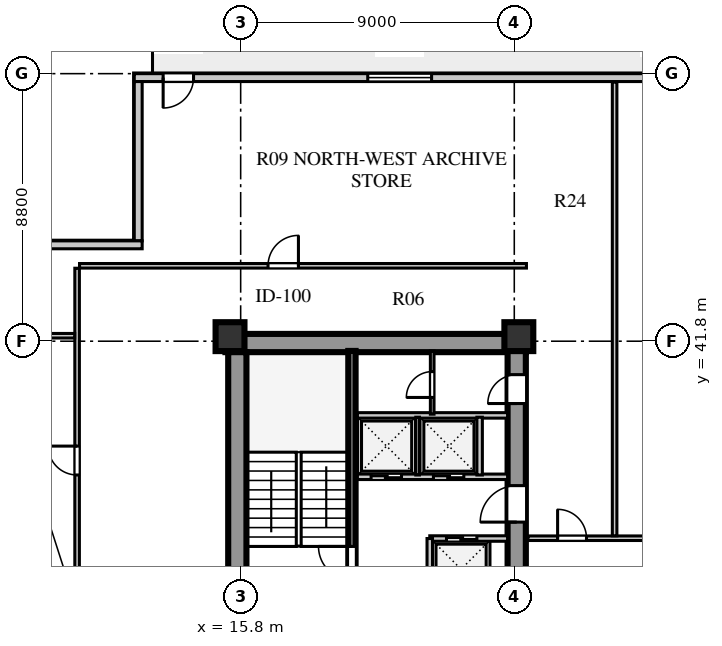
"""IFC4 building model, lengths in metres.
Left out: names, types, materials, properties, quantities, classifications, styles, units other than length and angle.
Written with IfcOpenShell. Run it as: python <this file> out.ifc"""

import sys

from ifc_helpers import new_model, si_unit, direction, frame, frame_2d, origin, origin_2d, place, context, subcontext, project, spatial, rectangle, extrude, element, fill, save


model = new_model("IFC4")
c1 = context("Model", 3, precision=1e-05, world=origin(), true_north=direction((0.0, 1.0)))
c2 = subcontext(c1, "Body", "Model", "MODEL_VIEW")
j1 = project(units=[si_unit("LENGTHUNIT", "METRE"), si_unit("PLANEANGLEUNIT", "RADIAN")], contexts=[c1])
p1 = place(None, origin())
s1 = spatial("IfcSite", under=j1, at=p1, CompositionType="ELEMENT")
p2 = place(p1, origin())
s2 = spatial("IfcBuilding", under=s1, at=p2, CompositionType="ELEMENT")
p3 = place(p2, frame((0.0, 0.0, 58.0)))
s3 = spatial("IfcBuildingStorey", under=s2, at=p3, CompositionType="ELEMENT", Elevation=58.0)
p4 = place(p3, frame((15.3, 41.74, 0.0), z_axis=(0.0, 0.0, 1.0), x_axis=(1.0, 0.0, 0.0)))
e1 = element("IfcWall", 1, at=p4, inside=s3, PredefinedType="SHEAR", context=c2, shape_type="SweptSolid", body=[
    extrude(rectangle(XDim=9.88, YDim=0.6, at=frame_2d((4.94, 0.0))), origin(), (0.0, 0.0, 1.0), 3.72),
])
p5 = place(p3, frame((15.69, 15.81, 0.0), z_axis=(0.0, 0.0, 1.0), x_axis=(0.0, 1.0, 0.0)))
e2 = element("IfcWall", 2, at=p5, inside=s3, PredefinedType="SHEAR", context=c2, shape_type="SweptSolid", body=[
    extrude(rectangle(XDim=25.63, YDim=0.6, at=frame_2d((12.815, 0.0))), origin(), (0.0, 0.0, 1.0), 3.72),
])
p6 = place(p3, frame((24.88, 15.74, 0.0), z_axis=(0.0, 0.0, 1.0), x_axis=(0.0, 1.0, 0.0)))
e3 = element("IfcWall", 3, at=p6, inside=s3, PredefinedType="SHEAR", context=c2, shape_type="SweptSolid", body=[
    extrude(rectangle(XDim=25.76, YDim=0.6, at=frame_2d((12.88, 0.0))), origin(), (0.0, 0.0, 1.0), 3.72),
])
p7 = place(p6, frame((1.61, 0.0, 0.0)))
e4 = element("IfcOpeningElement", 4, at=p7, cuts=e3, PredefinedType="OPENING", context=c2, shape_type="SweptSolid", body=[
    extrude(rectangle(XDim=1.2, YDim=2.1, at=frame_2d((0.6, 1.05))), frame((0.0, 0.31, 0.0), z_axis=(0.0, -1.0, 0.0), x_axis=(1.0, 0.0, 0.0)), (0.0, 0.0, 1.0), 0.62),
])
p8 = place(p6, frame((6.78, 0.0, 0.0)))
e5 = element("IfcOpeningElement", 5, at=p8, cuts=e3, PredefinedType="OPENING", context=c2, shape_type="SweptSolid", body=[
    extrude(rectangle(XDim=0.85, YDim=2.06, at=frame_2d((0.425, 1.03))), frame((0.0, 0.31, 0.0), z_axis=(0.0, -1.0, 0.0), x_axis=(1.0, 0.0, 0.0)), (0.0, 0.0, 1.0), 0.62),
])
p9 = place(p6, frame((12.11, 0.0, 0.0)))
e6 = element("IfcOpeningElement", 6, at=p9, cuts=e3, PredefinedType="OPENING", context=c2, shape_type="SweptSolid", body=[
    extrude(rectangle(XDim=1.5, YDim=2.12, at=frame_2d((0.75, 1.06))), frame((0.0, 0.31, 0.0), z_axis=(0.0, -1.0, 0.0), x_axis=(1.0, 0.0, 0.0)), (0.0, 0.0, 1.0), 0.62),
])
p10 = place(p6, frame((20.11, 0.0, 0.0)))
e7 = element("IfcOpeningElement", 7, at=p10, cuts=e3, PredefinedType="OPENING", context=c2, shape_type="SweptSolid", body=[
    extrude(rectangle(XDim=1.2, YDim=2.12, at=frame_2d((0.6, 1.06))), frame((0.0, 0.31, 0.0), z_axis=(0.0, -1.0, 0.0), x_axis=(1.0, 0.0, 0.0)), (0.0, 0.0, 1.0), 0.62),
])
p11 = place(p6, frame((24.01, 0.0, 0.0)))
e8 = element("IfcOpeningElement", 8, at=p11, cuts=e3, PredefinedType="OPENING", context=c2, shape_type="SweptSolid", body=[
    extrude(rectangle(XDim=0.95, YDim=2.1, at=frame_2d((0.475, 1.05))), frame((0.0, 0.31, 0.0), z_axis=(0.0, -1.0, 0.0), x_axis=(1.0, 0.0, 0.0)), (0.0, 0.0, 1.0), 0.62),
])
for number, where, z_axis, x_axis in (
    (9, (15.45, 41.95, 0.0), (0.0, 0.0, 1.0), (1.0, 0.0, 0.0)),
    (10, (24.95, 41.95, 0.0), (0.0, 0.0, 1.0), (1.0, 0.0, 0.0)),
):
    element("IfcColumn", number, at=place(p3, frame(where, z_axis=z_axis, x_axis=x_axis)), inside=s3, PredefinedType="COLUMN", context=c2, shape_type="SweptSolid", body=[
        extrude(rectangle(XDim=0.95, YDim=0.95, at=origin_2d()), origin(), (0.0, 0.0, 1.0), 3.72),
    ])
p12 = place(p3, frame((46.3, 50.47, 0.0), z_axis=(0.0, 0.0, 1.0), x_axis=(-1.0, 0.0, 0.0)))
e11 = element("IfcWall", 11, at=p12, inside=s3, PredefinedType="SOLIDWALL", context=c2, shape_type="SweptSolid", body=[
    extrude(rectangle(XDim=34.0, YDim=0.26, at=frame_2d((17.0, 0.0))), origin(), (0.0, 0.0, 1.0), 3.72),
])
p13 = place(p12, frame((32.05, 0.0, 0.0)))
e12 = element("IfcOpeningElement", 12, at=p13, cuts=e11, PredefinedType="OPENING", context=c2, shape_type="SweptSolid", body=[
    extrude(rectangle(XDim=1.0, YDim=2.05, at=frame_2d((0.5, 1.025))), frame((0.0, 0.14, 0.0), z_axis=(0.0, -1.0, 0.0), x_axis=(1.0, 0.0, 0.0)), (0.0, 0.0, 1.0), 0.28),
])
p14 = place(p12, frame((24.22, 0.0, 0.8)))
e13 = element("IfcOpeningElement", 13, at=p14, cuts=e11, PredefinedType="OPENING", context=c2, shape_type="SweptSolid", body=[
    extrude(rectangle(XDim=2.1, YDim=1.95, at=frame_2d((1.05, 0.975))), frame((0.0, 0.14, 0.0), z_axis=(0.0, -1.0, 0.0), x_axis=(1.0, 0.0, 0.0)), (0.0, 0.0, 1.0), 0.28),
])
p15 = place(p12, frame((15.875, 0.0, 0.8)))
e14 = element("IfcOpeningElement", 14, at=p15, cuts=e11, PredefinedType="OPENING", context=c2, shape_type="SweptSolid", body=[
    extrude(rectangle(XDim=1.35, YDim=1.9, at=frame_2d((0.675, 0.95))), frame((0.0, 0.14, 0.0), z_axis=(0.0, -1.0, 0.0), x_axis=(1.0, 0.0, 0.0)), (0.0, 0.0, 1.0), 0.28),
])
p16 = place(p12, frame((6.68, 0.0, 0.8)))
e15 = element("IfcOpeningElement", 15, at=p16, cuts=e11, PredefinedType="OPENING", context=c2, shape_type="SweptSolid", body=[
    extrude(rectangle(XDim=1.65, YDim=1.95, at=frame_2d((0.825, 0.975))), frame((0.0, 0.14, 0.0), z_axis=(0.0, -1.0, 0.0), x_axis=(1.0, 0.0, 0.0)), (0.0, 0.0, 1.0), 0.28),
])
p17 = place(p3, frame((12.43, 50.34, 0.0), z_axis=(0.0, 0.0, 1.0), x_axis=(0.0, -1.0, 0.0)))
e16 = element("IfcWall", 16, at=p17, inside=s3, PredefinedType="SOLIDWALL", context=c2, shape_type="SweptSolid", body=[
    extrude(rectangle(XDim=5.24, YDim=0.26, at=frame_2d((2.62, 0.0))), origin(), (0.0, 0.0, 1.0), 3.72),
])
p18 = place(p3, frame((12.56, 44.97, 0.0), z_axis=(0.0, 0.0, 1.0), x_axis=(-1.0, 0.0, 0.0)))
e17 = element("IfcWall", 17, at=p18, inside=s3, PredefinedType="SOLIDWALL", context=c2, shape_type="SweptSolid", body=[
    extrude(rectangle(XDim=5.76, YDim=0.26, at=frame_2d((2.88, 0.0))), origin(), (0.0, 0.0, 1.0), 3.72),
])
p19 = place(p3, frame((19.46, 33.3, 0.0), z_axis=(0.0, 0.0, 1.0), x_axis=(0.0, 1.0, 0.0)))
e18 = element("IfcWall", 18, at=p19, inside=s3, PredefinedType="SHEAR", context=c2, shape_type="SweptSolid", body=[
    extrude(rectangle(XDim=8.18, YDim=0.24, at=frame_2d((4.09, 0.0))), origin(), (0.0, 0.0, 1.0), 4.0),
])
p20 = place(p19, frame((0.65, 0.0, 0.0)))
e19 = element("IfcOpeningElement", 19, at=p20, cuts=e18, PredefinedType="OPENING", context=c2, shape_type="SweptSolid", body=[
    extrude(rectangle(XDim=1.1, YDim=2.1, at=frame_2d((0.55, 1.05))), frame((0.0, 0.13, 0.0), z_axis=(0.0, -1.0, 0.0), x_axis=(1.0, 0.0, 0.0)), (0.0, 0.0, 1.0), 0.26),
])
p21 = place(p3, frame((22.02, 35.31, 0.0), z_axis=(0.0, 0.0, 1.0), x_axis=(1.0, 0.0, 0.0)))
e20 = element("IfcWall", 20, at=p21, inside=s3, PredefinedType="SOLIDWALL", context=c2, shape_type="SweptSolid", body=[
    extrude(rectangle(XDim=2.56, YDim=0.18, at=frame_2d((1.28, 0.0))), origin(), (0.0, 0.0, 1.0), 3.72),
])
p22 = place(p21, frame((0.55, 0.0, 0.0)))
e21 = element("IfcOpeningElement", 21, at=p22, cuts=e20, PredefinedType="OPENING", context=c2, shape_type="SweptSolid", body=[
    extrude(rectangle(XDim=1.0, YDim=2.1, at=frame_2d((0.5, 1.05))), frame((0.0, 0.1, 0.0), z_axis=(0.0, -1.0, 0.0), x_axis=(1.0, 0.0, 0.0)), (0.0, 0.0, 1.0), 0.2),
])
p23 = place(p3, frame((22.02, 33.3, 0.0), z_axis=(0.0, 0.0, 1.0), x_axis=(0.0, 1.0, 0.0)))
e22 = element("IfcWall", 22, at=p23, inside=s3, PredefinedType="SOLIDWALL", context=c2, shape_type="SweptSolid", body=[
    extrude(rectangle(XDim=2.01, YDim=0.18, at=frame_2d((1.005, 0.0))), origin(), (0.0, 0.0, 1.0), 3.72),
])
p24 = place(p3, frame((19.64, 37.34, 0.0), z_axis=(0.0, 0.0, 1.0), x_axis=(1.0, 0.0, 0.0)))
e23 = element("IfcWall", 23, at=p24, inside=s3, PredefinedType="SOLIDWALL", context=c2, shape_type="SweptSolid", body=[
    extrude(rectangle(XDim=4.94, YDim=0.18, at=frame_2d((2.47, 0.0))), origin(), (0.0, 0.0, 1.0), 3.72),
])
p25 = place(p24, frame((0.45, 0.0, 0.0)))
e24 = element("IfcOpeningElement", 24, at=p25, cuts=e23, PredefinedType="OPENING", context=c2, shape_type="SweptSolid", body=[
    extrude(rectangle(XDim=1.0, YDim=2.1, at=frame_2d((0.5, 1.05))), frame((0.0, 0.1, 0.0), z_axis=(0.0, -1.0, 0.0), x_axis=(1.0, 0.0, 0.0)), (0.0, 0.0, 1.0), 0.2),
])
p26 = place(p24, frame((2.5, 0.0, 0.0)))
e25 = element("IfcOpeningElement", 25, at=p26, cuts=e23, PredefinedType="OPENING", context=c2, shape_type="SweptSolid", body=[
    extrude(rectangle(XDim=1.0, YDim=2.1, at=frame_2d((0.5, 1.05))), frame((0.0, 0.1, 0.0), z_axis=(0.0, -1.0, 0.0), x_axis=(1.0, 0.0, 0.0)), (0.0, 0.0, 1.0), 0.2),
])
p27 = place(p3, frame((19.64, 39.36, 0.0), z_axis=(0.0, 0.0, 1.0), x_axis=(1.0, 0.0, 0.0)))
e26 = element("IfcWall", 26, at=p27, inside=s3, PredefinedType="SOLIDWALL", context=c2, shape_type="SweptSolid", body=[
    extrude(rectangle(XDim=4.94, YDim=0.18, at=frame_2d((2.47, 0.0))), origin(), (0.0, 0.0, 1.0), 3.72),
])
p28 = place(p3, frame((21.62, 37.4, 0.0), z_axis=(0.0, 0.0, 1.0), x_axis=(0.0, 1.0, 0.0)))
e27 = element("IfcWall", 27, at=p28, inside=s3, PredefinedType="PARTITIONING", context=c2, shape_type="SweptSolid", body=[
    extrude(rectangle(XDim=1.9, YDim=0.12, at=frame_2d((0.95, 0.0))), origin(), (0.0, 0.0, 1.0), 3.72),
])
p29 = place(p3, frame((23.66, 37.4, 0.0), z_axis=(0.0, 0.0, 1.0), x_axis=(0.0, 1.0, 0.0)))
e28 = element("IfcWall", 28, at=p29, inside=s3, PredefinedType="SOLIDWALL", context=c2, shape_type="SweptSolid", body=[
    extrude(rectangle(XDim=1.9, YDim=0.18, at=frame_2d((0.95, 0.0))), origin(), (0.0, 0.0, 1.0), 3.72),
])
p30 = place(p3, frame((22.1, 39.4, 0.0), z_axis=(0.0, 0.0, 1.0), x_axis=(0.0, 1.0, 0.0)))
e29 = element("IfcWall", 29, at=p30, inside=s3, PredefinedType="PARTITIONING", context=c2, shape_type="SweptSolid", body=[
    extrude(rectangle(XDim=2.08, YDim=0.12, at=frame_2d((1.04, 0.0))), origin(), (0.0, 0.0, 1.0), 3.72),
])
p31 = place(p30, frame((0.55, 0.0, 0.0)))
e30 = element("IfcOpeningElement", 30, at=p31, cuts=e29, PredefinedType="OPENING", context=c2, shape_type="SweptSolid", body=[
    extrude(rectangle(XDim=0.85, YDim=2.06, at=frame_2d((0.425, 1.03))), frame((0.0, 0.07, 0.0), z_axis=(0.0, -1.0, 0.0), x_axis=(1.0, 0.0, 0.0)), (0.0, 0.0, 1.0), 0.14),
])
p32 = place(p3, frame((25.25, 35.32, 0.0), z_axis=(0.0, 0.0, 1.0), x_axis=(1.0, 0.0, 0.0)))
e31 = element("IfcWall", 31, at=p32, inside=s3, PredefinedType="PARTITIONING", context=c2, shape_type="SweptSolid", body=[
    extrude(rectangle(XDim=9.47, YDim=0.15, at=frame_2d((4.735, 0.0))), origin(), (0.0, 0.0, 1.0), 3.72),
])
p33 = place(p32, frame((0.975, 0.0, 0.0)))
e32 = element("IfcOpeningElement", 32, at=p33, cuts=e31, PredefinedType="OPENING", context=c2, shape_type="SweptSolid", body=[
    extrude(rectangle(XDim=0.95, YDim=2.08, at=frame_2d((0.475, 1.04))), frame((0.0, 0.085, 0.0), z_axis=(0.0, -1.0, 0.0), x_axis=(1.0, 0.0, 0.0)), (0.0, 0.0, 1.0), 0.17),
])
p34 = place(p32, frame((4.025, 0.0, 0.0)))
e33 = element("IfcOpeningElement", 33, at=p34, cuts=e31, PredefinedType="OPENING", context=c2, shape_type="SweptSolid", body=[
    extrude(rectangle(XDim=0.95, YDim=2.08, at=frame_2d((0.475, 1.04))), frame((0.0, 0.085, 0.0), z_axis=(0.0, -1.0, 0.0), x_axis=(1.0, 0.0, 0.0)), (0.0, 0.0, 1.0), 0.17),
])
p35 = place(p32, frame((7.315, 0.0, 0.0)))
e34 = element("IfcOpeningElement", 34, at=p35, cuts=e31, PredefinedType="OPENING", context=c2, shape_type="SweptSolid", body=[
    extrude(rectangle(XDim=0.95, YDim=2.08, at=frame_2d((0.475, 1.04))), frame((0.0, 0.085, 0.0), z_axis=(0.0, -1.0, 0.0), x_axis=(1.0, 0.0, 0.0)), (0.0, 0.0, 1.0), 0.17),
])
p36 = place(p3, frame((10.42, 13.0, 0.0), z_axis=(0.0, 0.0, 1.0), x_axis=(0.0, 1.0, 0.0)))
e35 = element("IfcWall", 35, at=p36, inside=s3, PredefinedType="PARTITIONING", context=c2, shape_type="SweptSolid", body=[
    extrude(rectangle(XDim=31.2, YDim=0.15, at=frame_2d((15.6, 0.0))), origin(), (0.0, 0.0, 1.0), 3.72),
])
p37 = place(p36, frame((5.8, 0.0, 0.0)))
e36 = element("IfcOpeningElement", 36, at=p37, cuts=e35, PredefinedType="OPENING", context=c2, shape_type="SweptSolid", body=[
    extrude(rectangle(XDim=0.95, YDim=2.08, at=frame_2d((0.475, 1.04))), frame((0.0, 0.085, 0.0), z_axis=(0.0, -1.0, 0.0), x_axis=(1.0, 0.0, 0.0)), (0.0, 0.0, 1.0), 0.17),
])
p38 = place(p36, frame((15.05, 0.0, 0.0)))
e37 = element("IfcOpeningElement", 37, at=p38, cuts=e35, PredefinedType="OPENING", context=c2, shape_type="SweptSolid", body=[
    extrude(rectangle(XDim=0.95, YDim=2.08, at=frame_2d((0.475, 1.04))), frame((0.0, 0.085, 0.0), z_axis=(0.0, -1.0, 0.0), x_axis=(1.0, 0.0, 0.0)), (0.0, 0.0, 1.0), 0.17),
])
p39 = place(p36, frame((24.4, 0.0, 0.0)))
e38 = element("IfcOpeningElement", 38, at=p39, cuts=e35, PredefinedType="OPENING", context=c2, shape_type="SweptSolid", body=[
    extrude(rectangle(XDim=0.95, YDim=2.08, at=frame_2d((0.475, 1.04))), frame((0.0, 0.085, 0.0), z_axis=(0.0, -1.0, 0.0), x_axis=(1.0, 0.0, 0.0)), (0.0, 0.0, 1.0), 0.17),
])
p40 = place(p3, frame((7.08, 41.98, 0.0), z_axis=(0.0, 0.0, 1.0), x_axis=(1.0, 0.0, 0.0)))
e39 = element("IfcWall", 39, at=p40, inside=s3, PredefinedType="PARTITIONING", context=c2, shape_type="SweptSolid", body=[
    extrude(rectangle(XDim=3.26, YDim=0.15, at=frame_2d((1.63, 0.0))), origin(), (0.0, 0.0, 1.0), 3.22),
])
p41 = place(p3, frame((10.5, 44.28, 0.0), z_axis=(0.0, 0.0, 1.0), x_axis=(1.0, 0.0, 0.0)))
e40 = element("IfcWall", 40, at=p41, inside=s3, PredefinedType="PARTITIONING", context=c2, shape_type="SweptSolid", body=[
    extrude(rectangle(XDim=14.7, YDim=0.15, at=frame_2d((7.35, 0.0))), origin(), (0.0, 0.0, 1.0), 3.72),
])
p42 = place(p41, frame((6.2, 0.0, 0.0)))
e41 = element("IfcOpeningElement", 41, at=p42, cuts=e40, PredefinedType="OPENING", context=c2, shape_type="SweptSolid", body=[
    extrude(rectangle(XDim=1.0, YDim=2.08, at=frame_2d((0.5, 1.04))), frame((0.0, 0.085, 0.0), z_axis=(0.0, -1.0, 0.0), x_axis=(1.0, 0.0, 0.0)), (0.0, 0.0, 1.0), 0.17),
])
p43 = place(p3, frame((28.1, 35.4, 0.0), z_axis=(0.0, 0.0, 1.0), x_axis=(0.0, 1.0, 0.0)))
e42 = element("IfcWall", 42, at=p43, inside=s3, PredefinedType="PARTITIONING", context=c2, shape_type="SweptSolid", body=[
    extrude(rectangle(XDim=14.92, YDim=0.15, at=frame_2d((7.46, 0.0))), origin(), (0.0, 0.0, 1.0), 3.72),
])
p44 = place(p13, frame((1.0, 0.0, 0.0), z_axis=(0.0, 0.0, 1.0), x_axis=(-1.0, 0.0, 0.0)))
e43 = element("IfcDoor", 43, at=p44, inside=s3, OperationType="SINGLE_SWING_LEFT", PredefinedType="DOOR", context=c2, shape_type="SweptSolid", body=[
    extrude(rectangle(XDim=1.0, YDim=2.05, at=frame_2d((0.5, 1.025))), frame((0.0, 0.025, 0.0), z_axis=(0.0, -1.0, 0.0), x_axis=(1.0, 0.0, 0.0)), (0.0, 0.0, 1.0), 0.05),
])
fill(e12, e43)
p45 = place(p14, origin())
e44 = element("IfcWindow", 44, at=p45, inside=s3, PartitioningType="SINGLE_PANEL", PredefinedType="WINDOW", context=c2, shape_type="SweptSolid", body=[
    extrude(rectangle(XDim=2.1, YDim=1.95, at=frame_2d((1.05, 0.975))), frame((0.0, 0.03, 0.0), z_axis=(0.0, -1.0, 0.0), x_axis=(1.0, 0.0, 0.0)), (0.0, 0.0, 1.0), 0.06),
])
fill(e13, e44)
p46 = place(p20, origin())
e45 = element("IfcDoor", 45, at=p46, inside=s3, OperationType="SINGLE_SWING_RIGHT", PredefinedType="DOOR", context=c2, shape_type="SweptSolid", body=[
    extrude(rectangle(XDim=1.1, YDim=2.1, at=frame_2d((0.55, 1.05))), frame((0.0, 0.025, 0.0), z_axis=(0.0, -1.0, 0.0), x_axis=(1.0, 0.0, 0.0)), (0.0, 0.0, 1.0), 0.05),
])
fill(e19, e45)
p47 = place(p10, frame((1.2, 0.0, 0.0), z_axis=(0.0, 0.0, 1.0), x_axis=(-1.0, 0.0, 0.0)))
e46 = element("IfcDoor", 46, at=p47, inside=s3, OperationType="SINGLE_SWING_RIGHT", PredefinedType="DOOR", context=c2, shape_type="SweptSolid", body=[
    extrude(rectangle(XDim=1.2, YDim=2.12, at=frame_2d((0.6, 1.06))), frame((0.0, 0.025, 0.0), z_axis=(0.0, -1.0, 0.0), x_axis=(1.0, 0.0, 0.0)), (0.0, 0.0, 1.0), 0.05),
])
fill(e7, e46)
p48 = place(p25, frame((1.0, 0.0, 0.0), z_axis=(0.0, 0.0, 1.0), x_axis=(-1.0, 0.0, 0.0)))
e47 = element("IfcDoor", 47, at=p48, inside=s3, OperationType="DOUBLE_DOOR_SLIDING", PredefinedType="DOOR", context=c2, shape_type="SweptSolid", body=[
    extrude(rectangle(XDim=1.0, YDim=2.1, at=frame_2d((0.5, 1.05))), frame((0.0, 0.025, 0.0), z_axis=(0.0, -1.0, 0.0), x_axis=(1.0, 0.0, 0.0)), (0.0, 0.0, 1.0), 0.05),
])
fill(e24, e47)
p49 = place(p26, frame((1.0, 0.0, 0.0), z_axis=(0.0, 0.0, 1.0), x_axis=(-1.0, 0.0, 0.0)))
e48 = element("IfcDoor", 48, at=p49, inside=s3, OperationType="DOUBLE_DOOR_SLIDING", PredefinedType="DOOR", context=c2, shape_type="SweptSolid", body=[
    extrude(rectangle(XDim=1.0, YDim=2.1, at=frame_2d((0.5, 1.05))), frame((0.0, 0.025, 0.0), z_axis=(0.0, -1.0, 0.0), x_axis=(1.0, 0.0, 0.0)), (0.0, 0.0, 1.0), 0.05),
])
fill(e25, e48)
p50 = place(p22, origin())
e49 = element("IfcDoor", 49, at=p50, inside=s3, OperationType="DOUBLE_DOOR_SLIDING", PredefinedType="DOOR", context=c2, shape_type="SweptSolid", body=[
    extrude(rectangle(XDim=1.0, YDim=2.1, at=frame_2d((0.5, 1.05))), frame((0.0, 0.025, 0.0), z_axis=(0.0, -1.0, 0.0), x_axis=(1.0, 0.0, 0.0)), (0.0, 0.0, 1.0), 0.05),
])
fill(e21, e49)
p51 = place(p31, origin())
e50 = element("IfcDoor", 50, at=p51, inside=s3, OperationType="SINGLE_SWING_LEFT", PredefinedType="DOOR", context=c2, shape_type="SweptSolid", body=[
    extrude(rectangle(XDim=0.85, YDim=2.06, at=frame_2d((0.425, 1.03))), frame((0.0, 0.025, 0.0), z_axis=(0.0, -1.0, 0.0), x_axis=(1.0, 0.0, 0.0)), (0.0, 0.0, 1.0), 0.05),
])
fill(e30, e50)
p52 = place(p11, frame((0.95, 0.0, 0.0), z_axis=(0.0, 0.0, 1.0), x_axis=(-1.0, 0.0, 0.0)))
e51 = element("IfcDoor", 51, at=p52, inside=s3, OperationType="SINGLE_SWING_RIGHT", PredefinedType="DOOR", context=c2, shape_type="SweptSolid", body=[
    extrude(rectangle(XDim=0.95, YDim=2.1, at=frame_2d((0.475, 1.05))), frame((0.0, 0.025, 0.0), z_axis=(0.0, -1.0, 0.0), x_axis=(1.0, 0.0, 0.0)), (0.0, 0.0, 1.0), 0.05),
])
fill(e8, e51)
p53 = place(p42, origin())
e52 = element("IfcDoor", 52, at=p53, inside=s3, OperationType="SINGLE_SWING_RIGHT", PredefinedType="DOOR", context=c2, shape_type="SweptSolid", body=[
    extrude(rectangle(XDim=1.0, YDim=2.08, at=frame_2d((0.5, 1.04))), frame((0.0, 0.025, 0.0), z_axis=(0.0, -1.0, 0.0), x_axis=(1.0, 0.0, 0.0)), (0.0, 0.0, 1.0), 0.05),
])
fill(e41, e52)
p54 = place(p39, frame((0.95, 0.0, 0.0), z_axis=(0.0, 0.0, 1.0), x_axis=(-1.0, 0.0, 0.0)))
e53 = element("IfcDoor", 53, at=p54, inside=s3, OperationType="SINGLE_SWING_LEFT", PredefinedType="DOOR", context=c2, shape_type="SweptSolid", body=[
    extrude(rectangle(XDim=0.95, YDim=2.08, at=frame_2d((0.475, 1.04))), frame((0.0, 0.025, 0.0), z_axis=(0.0, -1.0, 0.0), x_axis=(1.0, 0.0, 0.0)), (0.0, 0.0, 1.0), 0.05),
])
fill(e38, e53)
p55 = place(p33, origin())
e54 = element("IfcDoor", 54, at=p55, inside=s3, OperationType="SINGLE_SWING_LEFT", PredefinedType="DOOR", context=c2, shape_type="SweptSolid", body=[
    extrude(rectangle(XDim=0.95, YDim=2.08, at=frame_2d((0.475, 1.04))), frame((0.0, 0.025, 0.0), z_axis=(0.0, -1.0, 0.0), x_axis=(1.0, 0.0, 0.0)), (0.0, 0.0, 1.0), 0.05),
])
fill(e32, e54)
save(model, sys.argv[1])
